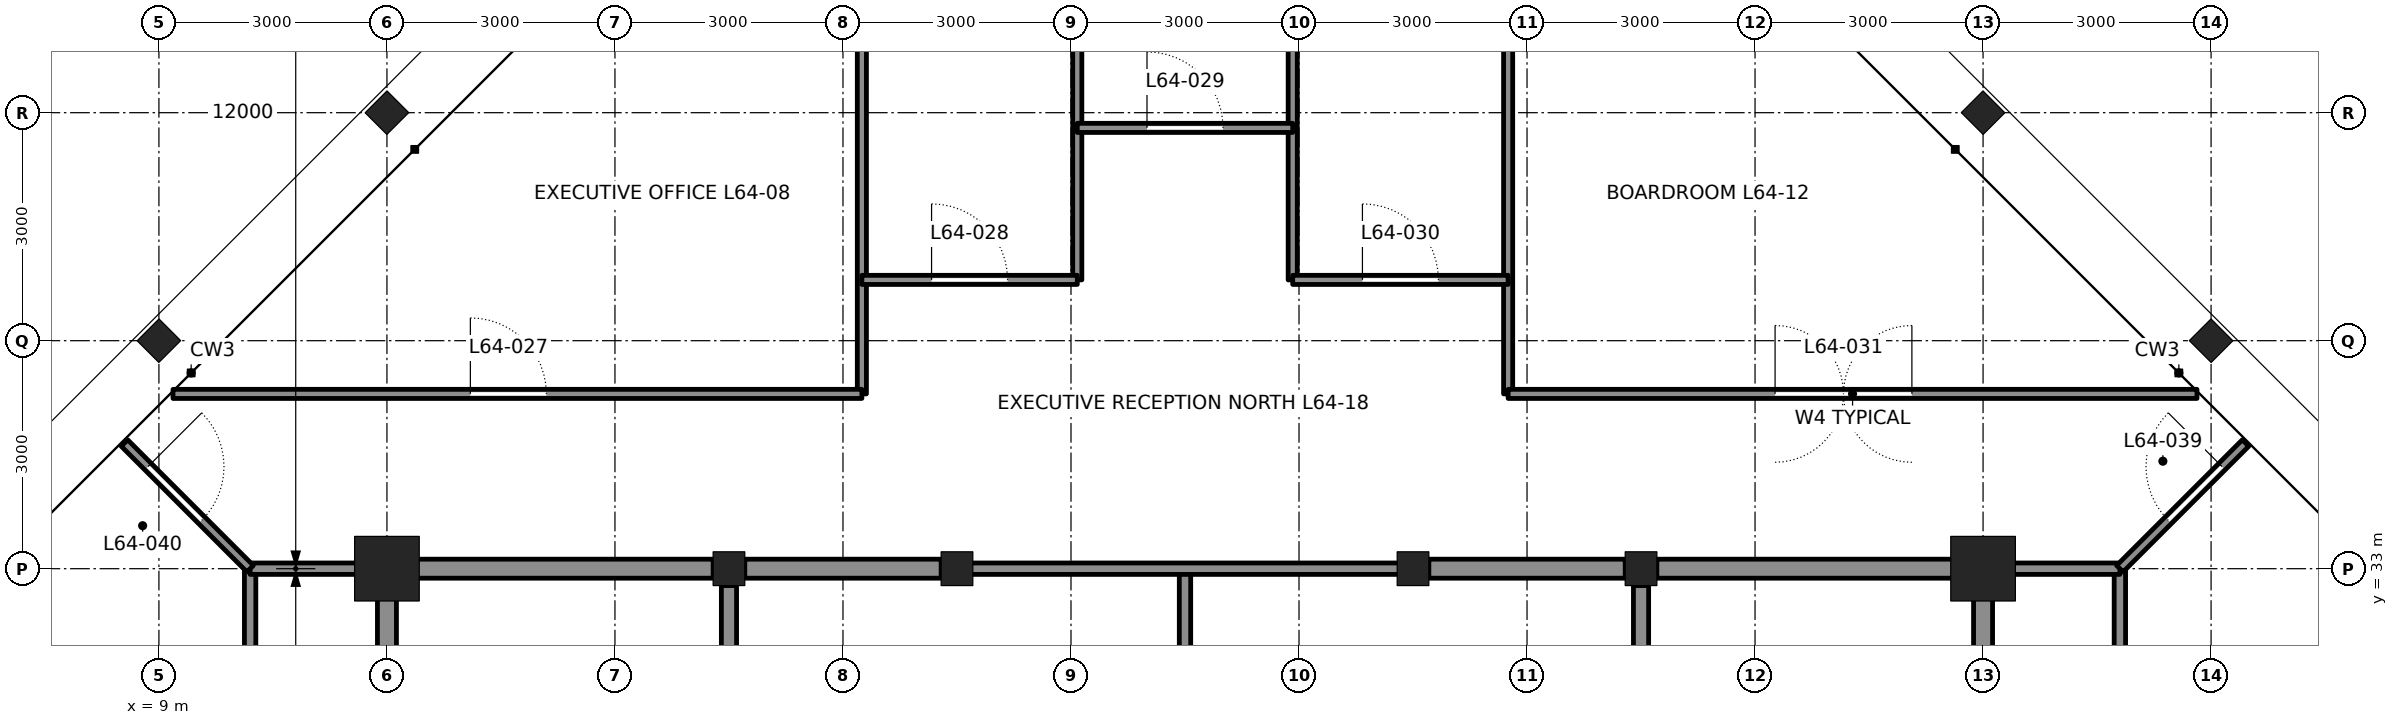
"""IFC4 building model, lengths in metres.
Left out: names, types, materials, properties, quantities, classifications, styles, units other than length and angle.
Written with IfcOpenShell. Run it as: python <this file> out.ifc"""

import sys

from ifc_helpers import new_model, si_unit, direction, frame, frame_2d, origin, origin_2d, place, context, subcontext, project, spatial, rectangle, hollow_rectangle, i_section, extrude, element, fill, save


model = new_model("IFC4")
c1 = context("Model", 3, precision=1e-05, world=origin(), true_north=direction((0.0, 1.0)))
c2 = subcontext(c1, "Body", "Model", "MODEL_VIEW")
j1 = project(units=[si_unit("LENGTHUNIT", "METRE"), si_unit("PLANEANGLEUNIT", "RADIAN")], contexts=[c1])
p1 = place(None, origin())
s1 = spatial("IfcSite", under=j1, at=p1, CompositionType="ELEMENT")
p2 = place(p1, origin())
s2 = spatial("IfcBuilding", under=s1, at=p2, CompositionType="ELEMENT")
p3 = place(p2, frame((0.0, 0.0, 287.4)))
s3 = spatial("IfcBuildingStorey", under=s2, at=p3, CompositionType="ELEMENT", Elevation=287.4)
for number, where, z_axis, x_axis in (
    (1, (36.0, 36.0, 0.0), (0.0, 0.0, 1.0), (0.707, 0.707, 0.0)),
    (2, (33.0, 39.0, 0.0), (0.0, 0.0, 1.0), (0.707, 0.707, 0.0)),
    (3, (12.0, 39.0, 0.0), (0.0, 0.0, 1.0), (-0.707, 0.707, 0.0)),
    (4, (9.0, 36.0, 0.0), (0.0, 0.0, 1.0), (-0.707, 0.707, 0.0)),
):
    element("IfcColumn", number, at=place(p3, frame(where, z_axis=z_axis, x_axis=x_axis)), inside=s3, PredefinedType="COLUMN", context=c2, shape_type="SweptSolid", body=[
        extrude(i_section(OverallWidth=0.404, OverallDepth=0.406, WebThickness=0.027, FlangeThickness=0.044, at=origin_2d()), origin(), (0.0, 0.0, 1.0), 4.2),
    ])
p4 = place(p3, frame((12.0, 33.0, 0.0), z_axis=(0.0, 0.0, 1.0), x_axis=(1.0, 0.0, 0.0)))
e5 = element("IfcColumn", 5, at=p4, inside=s3, PredefinedType="COLUMN", context=c2, shape_type="SweptSolid", body=[
    extrude(hollow_rectangle(XDim=0.85, YDim=0.85, WallThickness=0.085, at=origin_2d()), origin(), (0.0, 0.0, 1.0), 4.2),
])
for number, where, z_axis, x_axis in (
    (6, (16.5, 33.0, 0.0), (0.0, 0.0, 1.0), (1.0, 0.0, 0.0)),
    (7, (19.5, 33.0, 0.0), (0.0, 0.0, 1.0), (1.0, 0.0, 0.0)),
    (8, (25.5, 33.0, 0.0), (0.0, 0.0, 1.0), (1.0, 0.0, 0.0)),
    (9, (28.5, 33.0, 0.0), (0.0, 0.0, 1.0), (1.0, 0.0, 0.0)),
):
    element("IfcColumn", number, at=place(p3, frame(where, z_axis=z_axis, x_axis=x_axis)), inside=s3, PredefinedType="COLUMN", context=c2, shape_type="SweptSolid", body=[
        extrude(i_section(OverallWidth=0.417, OverallDepth=0.445, WebThickness=0.039, FlangeThickness=0.063, at=origin_2d()), origin(), (0.0, 0.0, 1.0), 4.2),
    ])
p5 = place(p3, frame((33.0, 33.0, 0.0), z_axis=(0.0, 0.0, 1.0), x_axis=(1.0, 0.0, 0.0)))
e10 = element("IfcColumn", 10, at=p5, inside=s3, PredefinedType="COLUMN", context=c2, shape_type="SweptSolid", body=[
    extrude(hollow_rectangle(XDim=0.85, YDim=0.85, WallThickness=0.085, at=origin_2d()), origin(), (0.0, 0.0, 1.0), 4.2),
])
p6 = place(p3, frame((12.0, 24.222, 0.0), z_axis=(0.0, 0.0, 1.0), x_axis=(0.0, 1.0, 0.0)))
e11 = element("IfcWall", 11, at=p6, inside=s3, PredefinedType="SOLIDWALL", context=c2, shape_type="SweptSolid", body=[
    extrude(rectangle(XDim=8.528, YDim=0.25, at=frame_2d((4.264, 0.0))), origin(), (0.0, 0.0, 1.0), 3.113),
])
p7 = place(p6, frame((0.678, 0.0, 0.0)))
e12 = element("IfcOpeningElement", 12, at=p7, cuts=e11, PredefinedType="OPENING", context=c2, shape_type="SweptSolid", body=[
    extrude(rectangle(XDim=1.2, YDim=2.1, at=frame_2d((0.6, 1.05))), frame((0.0, 0.135, 0.0), z_axis=(0.0, -1.0, 0.0), x_axis=(1.0, 0.0, 0.0)), (0.0, 0.0, 1.0), 0.27),
])
p8 = place(p6, frame((6.903, 0.0, 0.0)))
e13 = element("IfcOpeningElement", 13, at=p8, cuts=e11, PredefinedType="OPENING", context=c2, shape_type="SweptSolid", body=[
    extrude(rectangle(XDim=0.75, YDim=2.1, at=frame_2d((0.375, 1.05))), frame((0.0, 0.135, 0.0), z_axis=(0.0, -1.0, 0.0), x_axis=(1.0, 0.0, 0.0)), (0.0, 0.0, 1.0), 0.27),
])
p9 = place(p3, frame((12.25, 33.0, 0.0), z_axis=(0.0, 0.0, 1.0), x_axis=(1.0, 0.0, 0.0)))
e14 = element("IfcWall", 14, at=p9, inside=s3, PredefinedType="SOLIDWALL", context=c2, shape_type="SweptSolid", body=[
    extrude(rectangle(XDim=4.042, YDim=0.25, at=frame_2d((2.021, 0.0))), origin(), (0.0, 0.0, 1.0), 3.182),
])
for number, where, z_axis, x_axis in (
    (15, (16.708, 33.0, 0.0), (0.0, 0.0, 1.0), (1.0, 0.0, 0.0)),
    (16, (25.708, 33.0, 0.0), (0.0, 0.0, 1.0), (1.0, 0.0, 0.0)),
):
    element("IfcWall", number, at=place(p3, frame(where, z_axis=z_axis, x_axis=x_axis)), inside=s3, PredefinedType="SOLIDWALL", context=c2, shape_type="SweptSolid", body=[
        extrude(rectangle(XDim=2.583, YDim=0.25, at=frame_2d((1.292, 0.0))), origin(), (0.0, 0.0, 1.0), 3.182),
    ])
p10 = place(p3, frame((28.708, 33.0, 0.0), z_axis=(0.0, 0.0, 1.0), x_axis=(1.0, 0.0, 0.0)))
e17 = element("IfcWall", 17, at=p10, inside=s3, PredefinedType="SOLIDWALL", context=c2, shape_type="SweptSolid", body=[
    extrude(rectangle(XDim=4.042, YDim=0.25, at=frame_2d((2.021, 0.0))), origin(), (0.0, 0.0, 1.0), 3.182),
])
for number, where, z_axis, x_axis in (
    (18, (16.5, 24.222, 0.0), (0.0, 0.0, 1.0), (0.0, 1.0, 0.0)),
    (19, (28.5, 24.222, 0.0), (0.0, 0.0, 1.0), (0.0, 1.0, 0.0)),
):
    element("IfcWall", number, at=place(p3, frame(where, z_axis=z_axis, x_axis=x_axis)), inside=s3, PredefinedType="SOLIDWALL", context=c2, shape_type="SweptSolid", body=[
        extrude(rectangle(XDim=8.555, YDim=0.2, at=frame_2d((4.278, 0.0))), origin(), (0.0, 0.0, 1.0), 3.113),
    ])
p11 = place(p3, frame((33.0, 24.222, 0.0), z_axis=(0.0, 0.0, 1.0), x_axis=(0.0, 1.0, 0.0)))
e20 = element("IfcWall", 20, at=p11, inside=s3, PredefinedType="SOLIDWALL", context=c2, shape_type="SweptSolid", body=[
    extrude(rectangle(XDim=8.528, YDim=0.25, at=frame_2d((4.264, 0.0))), origin(), (0.0, 0.0, 1.0), 3.113),
])
p12 = place(p11, frame((6.903, 0.0, 0.0)))
e21 = element("IfcOpeningElement", 21, at=p12, cuts=e20, PredefinedType="OPENING", context=c2, shape_type="SweptSolid", body=[
    extrude(rectangle(XDim=0.75, YDim=2.1, at=frame_2d((0.375, 1.05))), frame((0.0, 0.135, 0.0), z_axis=(0.0, -1.0, 0.0), x_axis=(1.0, 0.0, 0.0)), (0.0, 0.0, 1.0), 0.27),
])
p13 = place(p3, frame((22.5, 27.0, 0.0), z_axis=(0.0, 0.0, 1.0), x_axis=(0.0, 1.0, 0.0)))
e22 = element("IfcWall", 22, at=p13, inside=s3, PredefinedType="PARTITIONING", context=c2, shape_type="SweptSolid", body=[
    extrude(rectangle(XDim=6.0, YDim=0.15, at=frame_2d((3.0, 0.0))), origin(), (0.0, 0.0, 1.0), 4.04),
])
p14 = place(p3, frame((19.5, 33.0, 0.0), z_axis=(0.0, 0.0, 1.0), x_axis=(1.0, 0.0, 0.0)))
e23 = element("IfcWall", 23, at=p14, inside=s3, PredefinedType="PARTITIONING", context=c2, shape_type="SweptSolid", body=[
    extrude(rectangle(XDim=6.0, YDim=0.15, at=frame_2d((3.0, 0.0))), origin(), (0.0, 0.0, 1.0), 3.182),
])
p15 = place(p3, frame((18.249, 44.334, 0.0), z_axis=(0.0, 0.0, 1.0), x_axis=(0.0, -1.0, 0.0)))
e24 = element("IfcWall", 24, at=p15, inside=s3, PredefinedType="PARTITIONING", context=c2, shape_type="SweptSolid", body=[
    extrude(rectangle(XDim=9.034, YDim=0.12, at=frame_2d((4.517, 0.0))), origin(), (0.0, 0.0, 1.0), 4.04),
])
for number, where, z_axis, x_axis in (
    (25, (21.083, 44.347, 0.0), (0.0, 0.0, 1.0), (0.0, -1.0, 0.0)),
    (26, (23.917, 44.347, 0.0), (0.0, 0.0, 1.0), (0.0, -1.0, 0.0)),
):
    element("IfcWall", number, at=place(p3, frame(where, z_axis=z_axis, x_axis=x_axis)), inside=s3, PredefinedType="PARTITIONING", context=c2, shape_type="SweptSolid", body=[
        extrude(rectangle(XDim=7.547, YDim=0.12, at=frame_2d((3.774, 0.0))), origin(), (0.0, 0.0, 1.0), 3.357),
    ])
p16 = place(p3, frame((26.751, 44.334, 0.0), z_axis=(0.0, 0.0, 1.0), x_axis=(0.0, -1.0, 0.0)))
e27 = element("IfcWall", 27, at=p16, inside=s3, PredefinedType="PARTITIONING", context=c2, shape_type="SweptSolid", body=[
    extrude(rectangle(XDim=9.034, YDim=0.12, at=frame_2d((4.517, 0.0))), origin(), (0.0, 0.0, 1.0), 4.04),
])
p17 = place(p3, frame((9.186, 35.3, 0.0), z_axis=(0.0, 0.0, 1.0), x_axis=(1.0, 0.0, 0.0)))
e28 = element("IfcWall", 28, at=p17, inside=s3, PredefinedType="PARTITIONING", context=c2, shape_type="SweptSolid", body=[
    extrude(rectangle(XDim=9.063, YDim=0.12, at=frame_2d((4.531, 0.0))), origin(), (0.0, 0.0, 1.0), 4.04),
])
p18 = place(p17, frame((3.912, 0.0, 0.0)))
e29 = element("IfcOpeningElement", 29, at=p18, cuts=e28, PredefinedType="OPENING", context=c2, shape_type="SweptSolid", body=[
    extrude(rectangle(XDim=1.0, YDim=2.4, at=frame_2d((0.5, 1.2))), frame((0.0, 0.07, 0.0), z_axis=(0.0, -1.0, 0.0), x_axis=(1.0, 0.0, 0.0)), (0.0, 0.0, 1.0), 0.14),
])
p19 = place(p3, frame((18.249, 36.8, 0.0), z_axis=(0.0, 0.0, 1.0), x_axis=(1.0, 0.0, 0.0)))
e30 = element("IfcWall", 30, at=p19, inside=s3, PredefinedType="PARTITIONING", context=c2, shape_type="SweptSolid", body=[
    extrude(rectangle(XDim=2.834, YDim=0.12, at=frame_2d((1.417, 0.0))), origin(), (0.0, 0.0, 1.0), 4.04),
])
p20 = place(p19, frame((0.917, 0.0, 0.0)))
e31 = element("IfcOpeningElement", 31, at=p20, cuts=e30, PredefinedType="OPENING", context=c2, shape_type="SweptSolid", body=[
    extrude(rectangle(XDim=1.0, YDim=2.4, at=frame_2d((0.5, 1.2))), frame((0.0, 0.07, 0.0), z_axis=(0.0, -1.0, 0.0), x_axis=(1.0, 0.0, 0.0)), (0.0, 0.0, 1.0), 0.14),
])
p21 = place(p3, frame((21.083, 38.8, 0.0), z_axis=(0.0, 0.0, 1.0), x_axis=(1.0, 0.0, 0.0)))
e32 = element("IfcWall", 32, at=p21, inside=s3, PredefinedType="PARTITIONING", context=c2, shape_type="SweptSolid", body=[
    extrude(rectangle(XDim=2.834, YDim=0.12, at=frame_2d((1.417, 0.0))), origin(), (0.0, 0.0, 1.0), 4.04),
])
p22 = place(p21, frame((0.917, 0.0, 0.0)))
e33 = element("IfcOpeningElement", 33, at=p22, cuts=e32, PredefinedType="OPENING", context=c2, shape_type="SweptSolid", body=[
    extrude(rectangle(XDim=1.0, YDim=2.4, at=frame_2d((0.5, 1.2))), frame((0.0, 0.07, 0.0), z_axis=(0.0, -1.0, 0.0), x_axis=(1.0, 0.0, 0.0)), (0.0, 0.0, 1.0), 0.14),
])
p23 = place(p3, frame((23.917, 36.8, 0.0), z_axis=(0.0, 0.0, 1.0), x_axis=(1.0, 0.0, 0.0)))
e34 = element("IfcWall", 34, at=p23, inside=s3, PredefinedType="PARTITIONING", context=c2, shape_type="SweptSolid", body=[
    extrude(rectangle(XDim=2.834, YDim=0.12, at=frame_2d((1.417, 0.0))), origin(), (0.0, 0.0, 1.0), 4.04),
])
p24 = place(p23, frame((0.917, 0.0, 0.0)))
e35 = element("IfcOpeningElement", 35, at=p24, cuts=e34, PredefinedType="OPENING", context=c2, shape_type="SweptSolid", body=[
    extrude(rectangle(XDim=1.0, YDim=2.4, at=frame_2d((0.5, 1.2))), frame((0.0, 0.07, 0.0), z_axis=(0.0, -1.0, 0.0), x_axis=(1.0, 0.0, 0.0)), (0.0, 0.0, 1.0), 0.14),
])
p25 = place(p3, frame((26.751, 35.3, 0.0), z_axis=(0.0, 0.0, 1.0), x_axis=(1.0, 0.0, 0.0)))
e36 = element("IfcWall", 36, at=p25, inside=s3, PredefinedType="PARTITIONING", context=c2, shape_type="SweptSolid", body=[
    extrude(rectangle(XDim=9.063, YDim=0.12, at=frame_2d((4.531, 0.0))), origin(), (0.0, 0.0, 1.0), 4.04),
])
p26 = place(p25, frame((3.512, 0.0, 0.0)))
e37 = element("IfcOpeningElement", 37, at=p26, cuts=e36, PredefinedType="OPENING", context=c2, shape_type="SweptSolid", body=[
    extrude(rectangle(XDim=1.8, YDim=2.4, at=frame_2d((0.9, 1.2))), frame((0.0, 0.07, 0.0), z_axis=(0.0, -1.0, 0.0), x_axis=(1.0, 0.0, 0.0)), (0.0, 0.0, 1.0), 0.14),
])
p27 = place(p3, frame((10.2, 8.686, 0.0), z_axis=(0.0, 0.0, 1.0), x_axis=(0.0, 1.0, 0.0)))
e38 = element("IfcWall", 38, at=p27, inside=s3, PredefinedType="PARTITIONING", context=c2, shape_type="SweptSolid", body=[
    extrude(rectangle(XDim=24.314, YDim=0.15, at=frame_2d((12.157, 0.0))), origin(), (0.0, 0.0, 1.0), 4.04),
])
p28 = place(p27, frame((11.5, 0.0, 0.0)))
e39 = element("IfcOpeningElement", 39, at=p28, cuts=e38, PredefinedType="OPENING", context=c2, shape_type="SweptSolid", body=[
    extrude(rectangle(XDim=1.0, YDim=2.4, at=frame_2d((0.5, 1.2))), frame((0.0, 0.085, 0.0), z_axis=(0.0, -1.0, 0.0), x_axis=(1.0, 0.0, 0.0)), (0.0, 0.0, 1.0), 0.17),
])
p29 = place(p3, frame((10.2, 33.0, 0.0), z_axis=(0.0, 0.0, 1.0), x_axis=(1.0, 0.0, 0.0)))
e40 = element("IfcWall", 40, at=p29, inside=s3, PredefinedType="PARTITIONING", context=c2, shape_type="SweptSolid", body=[
    extrude(rectangle(XDim=1.8, YDim=0.15, at=frame_2d((0.9, 0.0))), origin(), (0.0, 0.0, 1.0), 3.271),
])
p30 = place(p3, frame((34.8, 8.686, 0.0), z_axis=(0.0, 0.0, 1.0), x_axis=(0.0, 1.0, 0.0)))
e41 = element("IfcWall", 41, at=p30, inside=s3, PredefinedType="PARTITIONING", context=c2, shape_type="SweptSolid", body=[
    extrude(rectangle(XDim=24.314, YDim=0.15, at=frame_2d((12.157, 0.0))), origin(), (0.0, 0.0, 1.0), 4.04),
])
p31 = place(p30, frame((11.5, 0.0, 0.0)))
e42 = element("IfcOpeningElement", 42, at=p31, cuts=e41, PredefinedType="OPENING", context=c2, shape_type="SweptSolid", body=[
    extrude(rectangle(XDim=1.0, YDim=2.4, at=frame_2d((0.5, 1.2))), frame((0.0, 0.085, 0.0), z_axis=(0.0, -1.0, 0.0), x_axis=(1.0, 0.0, 0.0)), (0.0, 0.0, 1.0), 0.17),
])
p32 = place(p3, frame((33.0, 33.0, 0.0), z_axis=(0.0, 0.0, 1.0), x_axis=(1.0, 0.0, 0.0)))
e43 = element("IfcWall", 43, at=p32, inside=s3, PredefinedType="PARTITIONING", context=c2, shape_type="SweptSolid", body=[
    extrude(rectangle(XDim=1.8, YDim=0.15, at=frame_2d((0.9, 0.0))), origin(), (0.0, 0.0, 1.0), 3.271),
])
p33 = place(p3, frame((34.8, 33.0, 0.0), z_axis=(0.0, 0.0, 1.0), x_axis=(0.707106781187, 0.707106781187, 0.0)))
e44 = element("IfcWall", 44, at=p33, inside=s3, PredefinedType="PARTITIONING", context=c2, shape_type="SweptSolid", body=[
    extrude(rectangle(XDim=2.338, YDim=0.12, at=frame_2d((1.169, 0.0))), origin(), (0.0, 0.0, 1.0), 4.04),
])
p34 = place(p33, frame((0.9, 0.0, 0.0)))
e45 = element("IfcOpeningElement", 45, at=p34, cuts=e44, PredefinedType="OPENING", context=c2, shape_type="SweptSolid", body=[
    extrude(rectangle(XDim=1.0, YDim=2.4, at=frame_2d((0.5, 1.2))), frame((0.0, 0.07, 0.0), z_axis=(0.0, -1.0, 0.0), x_axis=(1.0, 0.0, 0.0)), (0.0, 0.0, 1.0), 0.14),
])
p35 = place(p3, frame((10.2, 33.0, 0.0), z_axis=(0.0, 0.0, 1.0), x_axis=(-0.707106781187, 0.707106781187, 0.0)))
e46 = element("IfcWall", 46, at=p35, inside=s3, PredefinedType="PARTITIONING", context=c2, shape_type="SweptSolid", body=[
    extrude(rectangle(XDim=2.338, YDim=0.12, at=frame_2d((1.169, 0.0))), origin(), (0.0, 0.0, 1.0), 4.04),
])
p36 = place(p35, frame((0.9, 0.0, 0.0)))
e47 = element("IfcOpeningElement", 47, at=p36, cuts=e46, PredefinedType="OPENING", context=c2, shape_type="SweptSolid", body=[
    extrude(rectangle(XDim=1.0, YDim=2.4, at=frame_2d((0.5, 1.2))), frame((0.0, 0.07, 0.0), z_axis=(0.0, -1.0, 0.0), x_axis=(1.0, 0.0, 0.0)), (0.0, 0.0, 1.0), 0.14),
])
p37 = place(p18, origin())
e48 = element("IfcDoor", 48, at=p37, inside=s3, OperationType="SINGLE_SWING_LEFT", PredefinedType="DOOR", context=c2, shape_type="SweptSolid", body=[
    extrude(rectangle(XDim=1.0, YDim=2.4, at=frame_2d((0.5, 1.2))), frame((0.0, 0.025, 0.0), z_axis=(0.0, -1.0, 0.0), x_axis=(1.0, 0.0, 0.0)), (0.0, 0.0, 1.0), 0.05),
])
fill(e29, e48)
p38 = place(p20, origin())
e49 = element("IfcDoor", 49, at=p38, inside=s3, OperationType="SINGLE_SWING_LEFT", PredefinedType="DOOR", context=c2, shape_type="SweptSolid", body=[
    extrude(rectangle(XDim=1.0, YDim=2.4, at=frame_2d((0.5, 1.2))), frame((0.0, 0.025, 0.0), z_axis=(0.0, -1.0, 0.0), x_axis=(1.0, 0.0, 0.0)), (0.0, 0.0, 1.0), 0.05),
])
fill(e31, e49)
p39 = place(p22, origin())
e50 = element("IfcDoor", 50, at=p39, inside=s3, OperationType="SINGLE_SWING_LEFT", PredefinedType="DOOR", context=c2, shape_type="SweptSolid", body=[
    extrude(rectangle(XDim=1.0, YDim=2.4, at=frame_2d((0.5, 1.2))), frame((0.0, 0.025, 0.0), z_axis=(0.0, -1.0, 0.0), x_axis=(1.0, 0.0, 0.0)), (0.0, 0.0, 1.0), 0.05),
])
fill(e33, e50)
p40 = place(p24, origin())
e51 = element("IfcDoor", 51, at=p40, inside=s3, OperationType="SINGLE_SWING_LEFT", PredefinedType="DOOR", context=c2, shape_type="SweptSolid", body=[
    extrude(rectangle(XDim=1.0, YDim=2.4, at=frame_2d((0.5, 1.2))), frame((0.0, 0.025, 0.0), z_axis=(0.0, -1.0, 0.0), x_axis=(1.0, 0.0, 0.0)), (0.0, 0.0, 1.0), 0.05),
])
fill(e35, e51)
p41 = place(p26, origin())
e52 = element("IfcDoor", 52, at=p41, inside=s3, OperationType="DOUBLE_DOOR_DOUBLE_SWING", PredefinedType="DOOR", context=c2, shape_type="SweptSolid", body=[
    extrude(rectangle(XDim=1.8, YDim=2.4, at=frame_2d((0.9, 1.2))), frame((0.0, 0.025, 0.0), z_axis=(0.0, -1.0, 0.0), x_axis=(1.0, 0.0, 0.0)), (0.0, 0.0, 1.0), 0.05),
])
fill(e37, e52)
p42 = place(p34, origin())
e53 = element("IfcDoor", 53, at=p42, inside=s3, OperationType="SINGLE_SWING_RIGHT", PredefinedType="DOOR", context=c2, shape_type="SweptSolid", body=[
    extrude(rectangle(XDim=1.0, YDim=2.4, at=frame_2d((0.5, 1.2))), frame((0.0, 0.025, 0.0), z_axis=(0.0, -1.0, 0.0), x_axis=(1.0, 0.0, 0.0)), (0.0, 0.0, 1.0), 0.05),
])
fill(e45, e53)
p43 = place(p36, frame((1.0, 0.0, 0.0), z_axis=(0.0, 0.0, 1.0), x_axis=(-1.0, 0.0, 0.0)))
e54 = element("IfcDoor", 54, at=p43, inside=s3, OperationType="SINGLE_SWING_LEFT", PredefinedType="DOOR", context=c2, shape_type="SweptSolid", body=[
    extrude(rectangle(XDim=1.0, YDim=2.4, at=frame_2d((0.5, 1.2))), frame((0.0, 0.025, 0.0), z_axis=(0.0, -1.0, 0.0), x_axis=(1.0, 0.0, 0.0)), (0.0, 0.0, 1.0), 0.05),
])
fill(e47, e54)
save(model, sys.argv[1])
